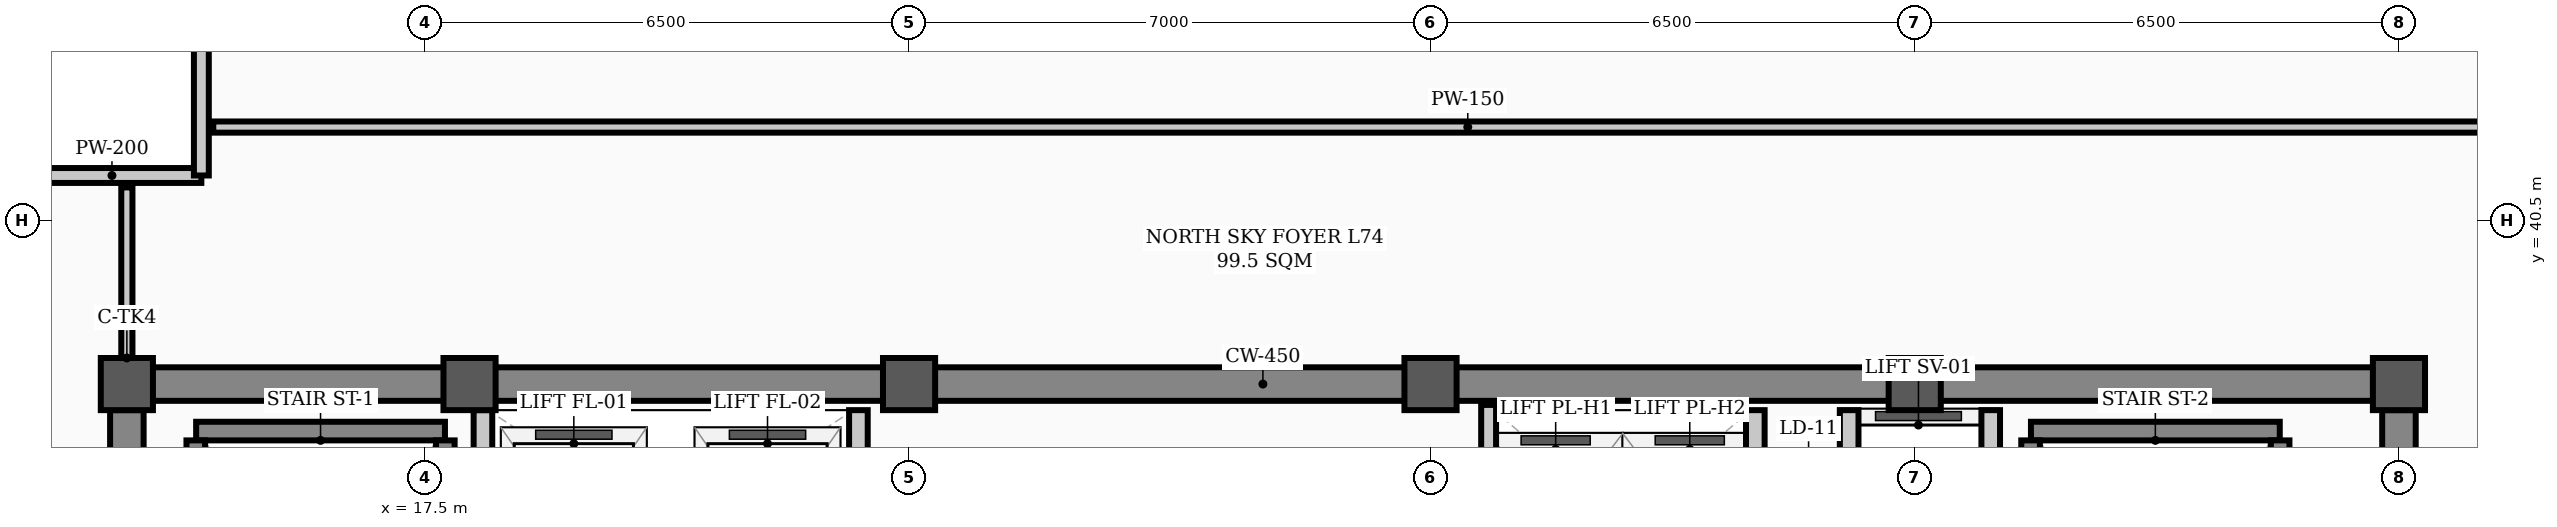
"""IFC4 building model, lengths in metres.
Left out: names, types, materials, properties, quantities, classifications, styles, units other than length and angle.
Written with IfcOpenShell. Run it as: python <this file> out.ifc"""

import sys

from ifc_helpers import new_model, si_unit, direction, frame, frame_2d, origin, origin_2d, place, context, subcontext, project, spatial, rectangle, hollow_rectangle, extrude, element, save


model = new_model("IFC4")
c1 = context("Model", 3, precision=1e-05, world=origin(), true_north=direction((0.0, 1.0)))
c2 = subcontext(c1, "Body", "Model", "MODEL_VIEW")
j1 = project(units=[si_unit("LENGTHUNIT", "METRE"), si_unit("PLANEANGLEUNIT", "RADIAN")], contexts=[c1])
p1 = place(None, origin())
s1 = spatial("IfcSite", under=j1, at=p1, CompositionType="ELEMENT")
p2 = place(p1, origin())
s2 = spatial("IfcBuilding", under=s1, at=p2, CompositionType="ELEMENT")
p3 = place(p2, frame((0.0, 0.0, 296.9)))
s3 = spatial("IfcBuildingStorey", under=s2, at=p3, CompositionType="ELEMENT", Elevation=296.9)
for number, where, z_axis, x_axis in (
    (1, (13.5, 38.3, 0.0), (0.0, 0.0, 1.0), (1.0, 0.0, 0.0)),
    (2, (18.1, 38.3, 0.0), (0.0, 0.0, 1.0), (1.0, 0.0, 0.0)),
    (3, (24.0, 38.3, 0.0), (0.0, 0.0, 1.0), (1.0, 0.0, 0.0)),
    (4, (31.0, 38.3, 0.0), (0.0, 0.0, 1.0), (1.0, 0.0, 0.0)),
    (5, (37.5, 38.3, 0.0), (0.0, 0.0, 1.0), (1.0, 0.0, 0.0)),
    (6, (44.0, 38.3, 0.0), (0.0, 0.0, 1.0), (1.0, 0.0, 0.0)),
):
    element("IfcColumn", number, at=place(p3, frame(where, z_axis=z_axis, x_axis=x_axis)), inside=s3, PredefinedType="COLUMN", context=c2, shape_type="SweptSolid", body=[
        extrude(hollow_rectangle(XDim=0.7, YDim=0.7, WallThickness=0.028, InnerFilletRadius=0.014, OuterFilletRadius=0.042, at=origin_2d()), origin(), (0.0, 0.0, 1.0), 3.9),
    ])
for number, where, z_axis, x_axis in (
    (7, (12.1, 41.1, 0.0), (0.0, 0.0, 1.0), (1.0, 0.0, 0.0)),
    (8, (14.5, 41.1, 0.0), (0.0, 0.0, 1.0), (0.0, 1.0, 0.0)),
):
    element("IfcWall", number, at=place(p3, frame(where, z_axis=z_axis, x_axis=x_axis)), inside=s3, PredefinedType="PARAPET", context=c2, shape_type="SweptSolid", body=[
        extrude(rectangle(XDim=2.4, YDim=0.2, at=frame_2d((1.2, 0.0))), origin(), (0.0, 0.0, 1.0), 1.2),
    ])
p4 = place(p3, frame((13.5, 38.3, 0.0), z_axis=(0.0, 0.0, 1.0), x_axis=(1.0, 0.0, 0.0)))
e9 = element("IfcWall", 9, at=p4, inside=s3, PredefinedType="SHEAR", context=c2, shape_type="SweptSolid", body=[
    extrude(rectangle(XDim=30.5, YDim=0.45, at=frame_2d((15.25, 0.0))), origin(), (0.0, 0.0, 1.0), 3.72),
])
for number, where, z_axis, x_axis in (
    (10, (13.5, 29.35, 0.0), (0.0, 0.0, 1.0), (0.0, 1.0, 0.0)),
    (11, (44.0, 29.35, 0.0), (0.0, 0.0, 1.0), (0.0, 1.0, 0.0)),
):
    element("IfcWall", number, at=place(p3, frame(where, z_axis=z_axis, x_axis=x_axis)), inside=s3, PredefinedType="SHEAR", context=c2, shape_type="SweptSolid", body=[
        extrude(rectangle(XDim=8.6, YDim=0.45, at=frame_2d((4.3, 0.0))), origin(), (0.0, 0.0, 1.0), 3.72),
    ])
p5 = place(p3, frame((14.43, 37.669, 0.0), z_axis=(0.0, 0.0, 1.0), x_axis=(1.0, 0.0, 0.0)))
e12 = element("IfcWall", 12, at=p5, inside=s3, PredefinedType="STANDARD", context=c2, shape_type="SweptSolid", body=[
    extrude(rectangle(XDim=3.34, YDim=0.25, at=frame_2d((1.67, 0.0))), origin(), (0.0, 0.0, 1.0), 3.72),
])
for number, where, z_axis, x_axis in (
    (13, (14.425, 30.36, 0.0), (0.0, 0.0, 1.0), (0.0, 1.0, 0.0)),
    (14, (17.775, 30.36, 0.0), (0.0, 0.0, 1.0), (0.0, 1.0, 0.0)),
):
    element("IfcWall", number, at=place(p3, frame(where, z_axis=z_axis, x_axis=x_axis)), inside=s3, PredefinedType="STANDARD", context=c2, shape_type="SweptSolid", body=[
        extrude(rectangle(XDim=7.184, YDim=0.25, at=frame_2d((3.592, 0.0))), origin(), (0.0, 0.0, 1.0), 3.72),
    ])
p6 = place(p3, frame((39.06, 37.669, 0.0), z_axis=(0.0, 0.0, 1.0), x_axis=(1.0, 0.0, 0.0)))
e15 = element("IfcWall", 15, at=p6, inside=s3, PredefinedType="STANDARD", context=c2, shape_type="SweptSolid", body=[
    extrude(rectangle(XDim=3.34, YDim=0.25, at=frame_2d((1.67, 0.0))), origin(), (0.0, 0.0, 1.0), 3.72),
])
for number, where, z_axis, x_axis in (
    (16, (39.055, 30.36, 0.0), (0.0, 0.0, 1.0), (0.0, 1.0, 0.0)),
    (17, (42.405, 30.36, 0.0), (0.0, 0.0, 1.0), (0.0, 1.0, 0.0)),
):
    element("IfcWall", number, at=place(p3, frame(where, z_axis=z_axis, x_axis=x_axis)), inside=s3, PredefinedType="STANDARD", context=c2, shape_type="SweptSolid", body=[
        extrude(rectangle(XDim=7.184, YDim=0.25, at=frame_2d((3.592, 0.0))), origin(), (0.0, 0.0, 1.0), 3.72),
    ])
p7 = place(p3, frame((36.62, 31.95, 0.0), z_axis=(0.0, 0.0, 1.0), x_axis=(0.0, 1.0, 0.0)))
e18 = element("IfcWall", 18, at=p7, inside=s3, PredefinedType="STANDARD", context=c2, shape_type="SweptSolid", body=[
    extrude(rectangle(XDim=6.0, YDim=0.25, at=frame_2d((3.0, 0.0))), origin(), (0.0, 0.0, 1.0), 3.4),
])
p8 = place(p7, frame((0.9, 0.0, 0.0)))
e19 = element("IfcOpeningElement", 19, at=p8, cuts=e18, PredefinedType="OPENING", context=c2, shape_type="SweptSolid", body=[
    extrude(rectangle(XDim=1.1, YDim=2.08, at=frame_2d((0.55, 1.04))), frame((0.0, 0.135, 0.0), z_axis=(0.0, -1.0, 0.0), x_axis=(1.0, 0.0, 0.0)), (0.0, 0.0, 1.0), 0.27),
])
p9 = place(p7, frame((4.0, 0.0, 0.0)))
e20 = element("IfcOpeningElement", 20, at=p9, cuts=e18, PredefinedType="OPENING", context=c2, shape_type="SweptSolid", body=[
    extrude(rectangle(XDim=1.1, YDim=2.08, at=frame_2d((0.55, 1.04))), frame((0.0, 0.135, 0.0), z_axis=(0.0, -1.0, 0.0), x_axis=(1.0, 0.0, 0.0)), (0.0, 0.0, 1.0), 0.27),
])
p10 = place(p3, frame((38.52, 31.95, 0.0), z_axis=(0.0, 0.0, 1.0), x_axis=(0.0, 1.0, 0.0)))
e21 = element("IfcWall", 21, at=p10, inside=s3, PredefinedType="STANDARD", context=c2, shape_type="SweptSolid", body=[
    extrude(rectangle(XDim=6.0, YDim=0.25, at=frame_2d((3.0, 0.0))), origin(), (0.0, 0.0, 1.0), 3.4),
])
for number, where, z_axis, x_axis in (
    (22, (18.28, 34.62, 0.0), (0.0, 0.0, 1.0), (0.0, 1.0, 0.0)),
    (23, (23.32, 34.62, 0.0), (0.0, 0.0, 1.0), (0.0, 1.0, 0.0)),
):
    element("IfcWall", number, at=place(p3, frame(where, z_axis=z_axis, x_axis=x_axis)), inside=s3, PredefinedType="STANDARD", context=c2, shape_type="SweptSolid", body=[
        extrude(rectangle(XDim=3.33, YDim=0.25, at=frame_2d((1.665, 0.0))), origin(), (0.0, 0.0, 1.0), 3.72),
    ])
p11 = place(p3, frame((35.36, 34.9, 0.0), z_axis=(0.0, 0.0, 1.0), x_axis=(0.0, 1.0, 0.0)))
e24 = element("IfcWall", 24, at=p11, inside=s3, PredefinedType="STANDARD", context=c2, shape_type="SweptSolid", body=[
    extrude(rectangle(XDim=3.05, YDim=0.25, at=frame_2d((1.525, 0.0))), origin(), (0.0, 0.0, 1.0), 3.4),
])
p12 = place(p3, frame((14.66, 41.75, 0.0), z_axis=(0.0, 0.0, 1.0), x_axis=(1.0, 0.0, 0.0)))
e25 = element("IfcWall", 25, at=p12, inside=s3, PredefinedType="PARTITIONING", context=c2, shape_type="SweptSolid", body=[
    extrude(rectangle(XDim=33.68, YDim=0.15, at=frame_2d((16.84, 0.0))), origin(), (0.0, 0.0, 1.0), 3.2),
])
p13 = place(p3, frame((13.5, 38.535, 0.0), z_axis=(0.0, 0.0, 1.0), x_axis=(0.0, 1.0, 0.0)))
e26 = element("IfcWall", 26, at=p13, inside=s3, PredefinedType="PARTITIONING", context=c2, shape_type="SweptSolid", body=[
    extrude(rectangle(XDim=2.405, YDim=0.15, at=frame_2d((1.203, 0.0))), origin(), (0.0, 0.0, 1.0), 3.72),
])
p14 = place(p3, frame((31.78, 34.9, 0.0), z_axis=(0.0, 0.0, 1.0), x_axis=(0.0, 1.0, 0.0)))
e27 = element("IfcWall", 27, at=p14, inside=s3, PredefinedType="STANDARD", context=c2, shape_type="SweptSolid", body=[
    extrude(rectangle(XDim=3.12, YDim=0.2, at=frame_2d((1.56, 0.0))), origin(), (0.0, 0.0, 1.0), 3.4),
])
save(model, sys.argv[1])
